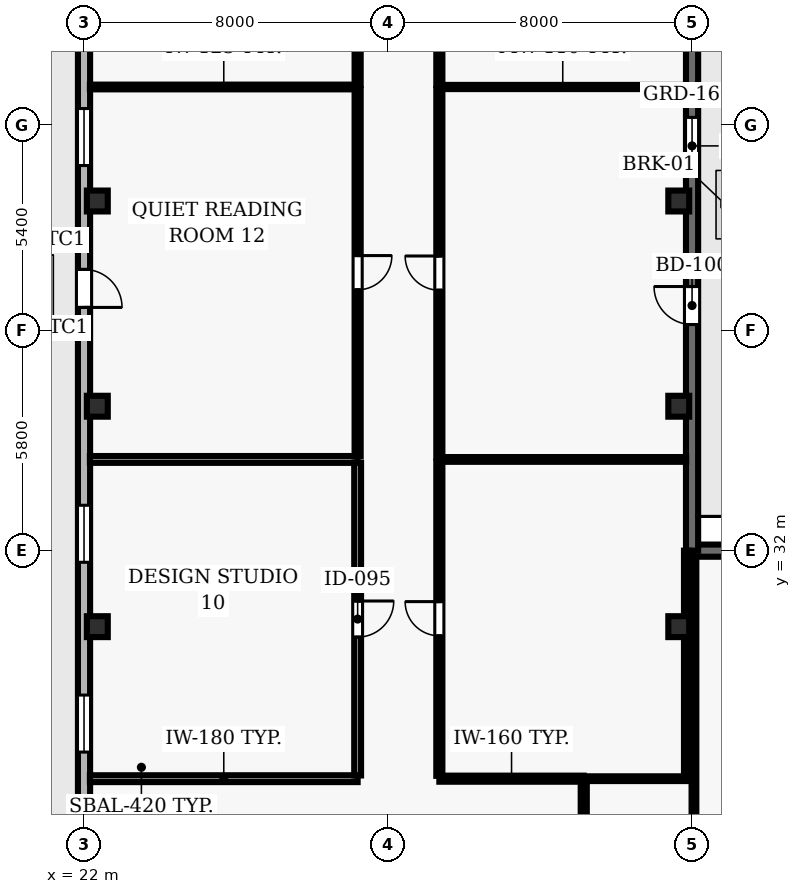
"""IFC4 building model, lengths in metres.
Left out: names, types, materials, properties, quantities, classifications, styles, units other than length and angle.
Written with IfcOpenShell. Run it as: python <this file> out.ifc"""

import sys

from ifc_helpers import new_model, si_unit, direction, frame, frame_2d, origin, origin_2d, place, context, subcontext, project, spatial, rectangle, hollow_rectangle, extrude, element, fill, save


model = new_model("IFC4")
c1 = context("Model", 3, precision=1e-05, world=origin(), true_north=direction((0.0, 1.0)))
c2 = subcontext(c1, "Body", "Model", "MODEL_VIEW")
j1 = project(units=[si_unit("LENGTHUNIT", "METRE"), si_unit("PLANEANGLEUNIT", "RADIAN")], contexts=[c1])
p1 = place(None, origin())
s1 = spatial("IfcSite", under=j1, at=p1, CompositionType="ELEMENT")
p2 = place(p1, origin())
s2 = spatial("IfcBuilding", under=s1, at=p2, CompositionType="ELEMENT")
p3 = place(p2, frame((0.0, 0.0, 26.0)))
s3 = spatial("IfcBuildingStorey", under=s2, at=p3, CompositionType="ELEMENT", Elevation=26.0)
for number, where, z_axis, x_axis in (
    (1, (22.35, 30.0, 0.0), (0.0, 0.0, 1.0), (1.0, 0.0, 0.0)),
    (2, (37.65, 30.0, 0.0), (0.0, 0.0, 1.0), (1.0, 0.0, 0.0)),
    (3, (22.35, 35.8, 0.0), (0.0, 0.0, 1.0), (1.0, 0.0, 0.0)),
    (4, (37.65, 35.8, 0.0), (0.0, 0.0, 1.0), (1.0, 0.0, 0.0)),
    (5, (22.35, 41.2, 0.0), (0.0, 0.0, 1.0), (1.0, 0.0, 0.0)),
    (6, (37.65, 41.2, 0.0), (0.0, 0.0, 1.0), (1.0, 0.0, 0.0)),
):
    element("IfcColumn", number, at=place(p3, frame(where, z_axis=z_axis, x_axis=x_axis)), inside=s3, PredefinedType="COLUMN", context=c2, shape_type="SweptSolid", body=[
        extrude(hollow_rectangle(XDim=0.55, YDim=0.55, WallThickness=0.025, at=origin_2d()), origin(), (0.0, 0.0, 1.0), 5.0),
    ])
p4 = place(p3, frame((52.8, 32.0, 0.0), z_axis=(0.0, 0.0, 1.0), x_axis=(-1.0, 0.0, 0.0)))
e7 = element("IfcWall", 7, at=p4, inside=s3, PredefinedType="SOLIDWALL", context=c2, shape_type="SweptSolid", body=[
    extrude(rectangle(XDim=14.8, YDim=0.32, at=frame_2d((7.4, 0.0))), origin(), (0.0, 0.0, 1.0), 4.79),
])
p5 = place(p4, frame((3.1, 0.0, 0.9)))
e8 = element("IfcOpeningElement", 8, at=p5, cuts=e7, PredefinedType="OPENING", context=c2, shape_type="SweptSolid", body=[
    extrude(rectangle(XDim=1.2, YDim=1.6, at=frame_2d((0.6, 0.8))), frame((0.0, 0.17, 0.0), z_axis=(0.0, -1.0, 0.0), x_axis=(1.0, 0.0, 0.0)), (0.0, 0.0, 1.0), 0.34),
])
p6 = place(p4, frame((10.5, 0.0, 0.9)))
e9 = element("IfcOpeningElement", 9, at=p6, cuts=e7, PredefinedType="OPENING", context=c2, shape_type="SweptSolid", body=[
    extrude(rectangle(XDim=1.2, YDim=1.6, at=frame_2d((0.6, 0.8))), frame((0.0, 0.17, 0.0), z_axis=(0.0, -1.0, 0.0), x_axis=(1.0, 0.0, 0.0)), (0.0, 0.0, 1.0), 0.34),
])
p7 = place(p3, frame((38.0, 32.0, 0.0), z_axis=(0.0, 0.0, 1.0), x_axis=(0.0, 1.0, 0.0)))
e10 = element("IfcWall", 10, at=p7, inside=s3, PredefinedType="SOLIDWALL", context=c2, shape_type="SweptSolid", body=[
    extrude(rectangle(XDim=19.5, YDim=0.32, at=frame_2d((9.75, 0.0))), origin(), (0.0, 0.0, 1.0), 4.79),
])
p8 = place(p7, frame((5.95, 0.0, 0.0)))
e11 = element("IfcOpeningElement", 11, at=p8, cuts=e10, PredefinedType="OPENING", context=c2, shape_type="SweptSolid", body=[
    extrude(rectangle(XDim=1.0, YDim=2.2, at=frame_2d((0.5, 1.1))), frame((0.0, 0.17, 0.0), z_axis=(0.0, -1.0, 0.0), x_axis=(1.0, 0.0, 0.0)), (0.0, 0.0, 1.0), 0.34),
])
p9 = place(p7, frame((9.9, 0.0, 0.9)))
e12 = element("IfcOpeningElement", 12, at=p9, cuts=e10, PredefinedType="OPENING", context=c2, shape_type="SweptSolid", body=[
    extrude(rectangle(XDim=1.5, YDim=1.6, at=frame_2d((0.75, 0.8))), frame((0.0, 0.17, 0.0), z_axis=(0.0, -1.0, 0.0), x_axis=(1.0, 0.0, 0.0)), (0.0, 0.0, 1.0), 0.34),
])
p10 = place(p7, frame((15.5, 0.0, 0.9)))
e13 = element("IfcOpeningElement", 13, at=p10, cuts=e10, PredefinedType="OPENING", context=c2, shape_type="SweptSolid", body=[
    extrude(rectangle(XDim=1.5, YDim=1.6, at=frame_2d((0.75, 0.8))), frame((0.0, 0.17, 0.0), z_axis=(0.0, -1.0, 0.0), x_axis=(1.0, 0.0, 0.0)), (0.0, 0.0, 1.0), 0.34),
])
p11 = place(p3, frame((22.0, 51.5, 0.0), z_axis=(0.0, 0.0, 1.0), x_axis=(0.0, -1.0, 0.0)))
e14 = element("IfcWall", 14, at=p11, inside=s3, PredefinedType="SOLIDWALL", context=c2, shape_type="SweptSolid", body=[
    extrude(rectangle(XDim=49.0, YDim=0.32, at=frame_2d((24.5, 0.0))), origin(), (0.0, 0.0, 1.0), 4.79),
])
p12 = place(p11, frame((12.1, 0.0, 0.0)))
e15 = element("IfcOpeningElement", 15, at=p12, cuts=e14, PredefinedType="OPENING", context=c2, shape_type="SweptSolid", body=[
    extrude(rectangle(XDim=1.0, YDim=2.2, at=frame_2d((0.5, 1.1))), frame((0.0, 0.17, 0.0), z_axis=(0.0, -1.0, 0.0), x_axis=(1.0, 0.0, 0.0)), (0.0, 0.0, 1.0), 0.34),
])
p13 = place(p11, frame((1.972, 0.0, 0.9)))
e16 = element("IfcOpeningElement", 16, at=p13, cuts=e14, PredefinedType="OPENING", context=c2, shape_type="SweptSolid", body=[
    extrude(rectangle(XDim=1.5, YDim=1.8, at=frame_2d((0.75, 0.9))), frame((0.0, 0.17, 0.0), z_axis=(0.0, -1.0, 0.0), x_axis=(1.0, 0.0, 0.0)), (0.0, 0.0, 1.0), 0.34),
])
p14 = place(p11, frame((7.867, 0.0, 0.9)))
e17 = element("IfcOpeningElement", 17, at=p14, cuts=e14, PredefinedType="OPENING", context=c2, shape_type="SweptSolid", body=[
    extrude(rectangle(XDim=1.5, YDim=1.8, at=frame_2d((0.75, 0.9))), frame((0.0, 0.17, 0.0), z_axis=(0.0, -1.0, 0.0), x_axis=(1.0, 0.0, 0.0)), (0.0, 0.0, 1.0), 0.34),
])
p15 = place(p11, frame((18.306, 0.0, 0.9)))
e18 = element("IfcOpeningElement", 18, at=p15, cuts=e14, PredefinedType="OPENING", context=c2, shape_type="SweptSolid", body=[
    extrude(rectangle(XDim=1.5, YDim=1.8, at=frame_2d((0.75, 0.9))), frame((0.0, 0.17, 0.0), z_axis=(0.0, -1.0, 0.0), x_axis=(1.0, 0.0, 0.0)), (0.0, 0.0, 1.0), 0.34),
])
p16 = place(p11, frame((23.3, 0.0, 0.9)))
e19 = element("IfcOpeningElement", 19, at=p16, cuts=e14, PredefinedType="OPENING", context=c2, shape_type="SweptSolid", body=[
    extrude(rectangle(XDim=1.5, YDim=1.8, at=frame_2d((0.75, 0.9))), frame((0.0, 0.17, 0.0), z_axis=(0.0, -1.0, 0.0), x_axis=(1.0, 0.0, 0.0)), (0.0, 0.0, 1.0), 0.34),
])
p17 = place(p11, frame((29.194, 0.0, 0.9)))
e20 = element("IfcOpeningElement", 20, at=p17, cuts=e14, PredefinedType="OPENING", context=c2, shape_type="SweptSolid", body=[
    extrude(rectangle(XDim=1.5, YDim=1.8, at=frame_2d((0.75, 0.9))), frame((0.0, 0.17, 0.0), z_axis=(0.0, -1.0, 0.0), x_axis=(1.0, 0.0, 0.0)), (0.0, 0.0, 1.0), 0.34),
])
p18 = place(p11, frame((34.189, 0.0, 0.9)))
e21 = element("IfcOpeningElement", 21, at=p18, cuts=e14, PredefinedType="OPENING", context=c2, shape_type="SweptSolid", body=[
    extrude(rectangle(XDim=1.5, YDim=1.8, at=frame_2d((0.75, 0.9))), frame((0.0, 0.17, 0.0), z_axis=(0.0, -1.0, 0.0), x_axis=(1.0, 0.0, 0.0)), (0.0, 0.0, 1.0), 0.34),
])
p19 = place(p11, frame((40.083, 0.0, 0.9)))
e22 = element("IfcOpeningElement", 22, at=p19, cuts=e14, PredefinedType="OPENING", context=c2, shape_type="SweptSolid", body=[
    extrude(rectangle(XDim=1.5, YDim=1.8, at=frame_2d((0.75, 0.9))), frame((0.0, 0.17, 0.0), z_axis=(0.0, -1.0, 0.0), x_axis=(1.0, 0.0, 0.0)), (0.0, 0.0, 1.0), 0.34),
])
for number, where, z_axis, x_axis in (
    (23, (29.2, 26.0, 0.0), (0.0, 0.0, 1.0), (-1.0, 0.0, 0.0)),
    (24, (29.2, 34.4, 0.0), (0.0, 0.0, 1.0), (-1.0, 0.0, 0.0)),
):
    element("IfcWall", number, at=place(p3, frame(where, z_axis=z_axis, x_axis=x_axis)), inside=s3, PredefinedType="PARTITIONING", context=c2, shape_type="SweptSolid", body=[
        extrude(rectangle(XDim=7.045, YDim=0.18, at=frame_2d((3.522, 0.0))), origin(), (0.0, 0.0, 1.0), 4.79),
    ])
p20 = place(p3, frame((29.2, 44.2, 0.0), z_axis=(0.0, 0.0, 1.0), x_axis=(-1.0, 0.0, 0.0)))
e25 = element("IfcWall", 25, at=p20, inside=s3, PredefinedType="PARTITIONING", context=c2, shape_type="SweptSolid", body=[
    extrude(rectangle(XDim=7.045, YDim=0.125, at=frame_2d((3.522, 0.0))), origin(), (0.0, 0.0, 1.0), 4.377),
])
p21 = place(p3, frame((35.15, 26.0, 0.0), z_axis=(0.0, 0.0, 1.0), x_axis=(-1.0, 0.0, 0.0)))
e26 = element("IfcWall", 26, at=p21, inside=s3, PredefinedType="PARTITIONING", context=c2, shape_type="SweptSolid", body=[
    extrude(rectangle(XDim=3.8, YDim=0.16, at=frame_2d((1.9, 0.0))), origin(), (0.0, 0.0, 1.0), 4.79),
])
p22 = place(p3, frame((35.15, 26.0, 0.0), z_axis=(0.0, 0.0, 1.0), x_axis=(1.0, 0.0, 0.0)))
e27 = element("IfcWall", 27, at=p22, inside=s3, PredefinedType="PARTITIONING", context=c2, shape_type="SweptSolid", body=[
    extrude(rectangle(XDim=2.7, YDim=0.125, at=frame_2d((1.35, 0.0))), origin(), (0.0, 0.0, 1.0), 4.79),
])
p23 = place(p3, frame((37.845, 34.4, 0.0), z_axis=(0.0, 0.0, 1.0), x_axis=(-1.0, 0.0, 0.0)))
e28 = element("IfcWall", 28, at=p23, inside=s3, PredefinedType="PARTITIONING", context=c2, shape_type="SweptSolid", body=[
    extrude(rectangle(XDim=6.495, YDim=0.125, at=frame_2d((3.248, 0.0))), origin(), (0.0, 0.0, 1.0), 4.79),
])
p24 = place(p3, frame((37.845, 44.2, 0.0), z_axis=(0.0, 0.0, 1.0), x_axis=(-1.0, 0.0, 0.0)))
e29 = element("IfcWall", 29, at=p24, inside=s3, PredefinedType="MOVABLE", context=c2, shape_type="SweptSolid", body=[
    extrude(rectangle(XDim=6.495, YDim=0.11, at=frame_2d((3.248, 0.0))), origin(), (0.0, 0.0, 1.0), 4.377),
])
p25 = place(p3, frame((29.2, 34.315, 0.0), z_axis=(0.0, 0.0, 1.0), x_axis=(0.0, -1.0, 0.0)))
e30 = element("IfcWall", 30, at=p25, inside=s3, PredefinedType="PARTITIONING", context=c2, shape_type="SweptSolid", body=[
    extrude(rectangle(XDim=8.23, YDim=0.18, at=frame_2d((4.115, 0.0))), origin(), (0.0, 0.0, 1.0), 4.79),
])
p26 = place(p25, frame((3.64, 0.0, 0.0)))
e31 = element("IfcOpeningElement", 31, at=p26, cuts=e30, PredefinedType="OPENING", context=c2, shape_type="SweptSolid", body=[
    extrude(rectangle(XDim=0.95, YDim=2.1, at=frame_2d((0.475, 1.05))), frame((0.0, 0.1, 0.0), z_axis=(0.0, -1.0, 0.0), x_axis=(1.0, 0.0, 0.0)), (0.0, 0.0, 1.0), 0.2),
])
p27 = place(p3, frame((29.2, 44.143, 0.0), z_axis=(0.0, 0.0, 1.0), x_axis=(0.0, -1.0, 0.0)))
e32 = element("IfcWall", 32, at=p27, inside=s3, PredefinedType="PARTITIONING", context=c2, shape_type="SweptSolid", body=[
    extrude(rectangle(XDim=9.658, YDim=0.16, at=frame_2d((4.829, 0.0))), origin(), (0.0, 0.0, 1.0), 4.79),
])
p28 = place(p27, frame((4.379, 0.0, 0.0)))
e33 = element("IfcOpeningElement", 33, at=p28, cuts=e32, PredefinedType="OPENING", context=c2, shape_type="SweptSolid", body=[
    extrude(rectangle(XDim=0.9, YDim=2.1, at=frame_2d((0.45, 1.05))), frame((0.0, 0.09, 0.0), z_axis=(0.0, -1.0, 0.0), x_axis=(1.0, 0.0, 0.0)), (0.0, 0.0, 1.0), 0.18),
])
p29 = place(p3, frame((29.2, 53.845, 0.0), z_axis=(0.0, 0.0, 1.0), x_axis=(0.0, -1.0, 0.0)))
e34 = element("IfcWall", 34, at=p29, inside=s3, PredefinedType="PARTITIONING", context=c2, shape_type="SweptSolid", body=[
    extrude(rectangle(XDim=9.587, YDim=0.16, at=frame_2d((4.793, 0.0))), origin(), (0.0, 0.0, 1.0), 4.79),
])
p30 = place(p29, frame((4.293, 0.0, 0.0)))
e35 = element("IfcOpeningElement", 35, at=p30, cuts=e34, PredefinedType="OPENING", context=c2, shape_type="SweptSolid", body=[
    extrude(rectangle(XDim=1.0, YDim=2.1, at=frame_2d((0.5, 1.05))), frame((0.0, 0.09, 0.0), z_axis=(0.0, -1.0, 0.0), x_axis=(1.0, 0.0, 0.0)), (0.0, 0.0, 1.0), 0.18),
])
p31 = place(p3, frame((31.35, 26.075, 0.0), z_axis=(0.0, 0.0, 1.0), x_axis=(0.0, 1.0, 0.0)))
e36 = element("IfcWall", 36, at=p31, inside=s3, PredefinedType="PARTITIONING", context=c2, shape_type="SweptSolid", body=[
    extrude(rectangle(XDim=8.268, YDim=0.16, at=frame_2d((4.134, 0.0))), origin(), (0.0, 0.0, 1.0), 4.79),
])
p32 = place(p31, frame((3.684, 0.0, 0.0)))
e37 = element("IfcOpeningElement", 37, at=p32, cuts=e36, PredefinedType="OPENING", context=c2, shape_type="SweptSolid", body=[
    extrude(rectangle(XDim=0.9, YDim=2.1, at=frame_2d((0.45, 1.05))), frame((0.0, 0.09, 0.0), z_axis=(0.0, -1.0, 0.0), x_axis=(1.0, 0.0, 0.0)), (0.0, 0.0, 1.0), 0.18),
])
p33 = place(p3, frame((31.35, 34.457, 0.0), z_axis=(0.0, 0.0, 1.0), x_axis=(0.0, 1.0, 0.0)))
e38 = element("IfcWall", 38, at=p33, inside=s3, PredefinedType="PARTITIONING", context=c2, shape_type="SweptSolid", body=[
    extrude(rectangle(XDim=9.693, YDim=0.16, at=frame_2d((4.846, 0.0))), origin(), (0.0, 0.0, 1.0), 4.79),
])
p34 = place(p33, frame((4.396, 0.0, 0.0)))
e39 = element("IfcOpeningElement", 39, at=p34, cuts=e38, PredefinedType="OPENING", context=c2, shape_type="SweptSolid", body=[
    extrude(rectangle(XDim=0.9, YDim=2.1, at=frame_2d((0.45, 1.05))), frame((0.0, 0.09, 0.0), z_axis=(0.0, -1.0, 0.0), x_axis=(1.0, 0.0, 0.0)), (0.0, 0.0, 1.0), 0.18),
])
p35 = place(p3, frame((31.35, 44.25, 0.0), z_axis=(0.0, 0.0, 1.0), x_axis=(0.0, 1.0, 0.0)))
e40 = element("IfcWall", 40, at=p35, inside=s3, PredefinedType="PARTITIONING", context=c2, shape_type="SweptSolid", body=[
    extrude(rectangle(XDim=9.595, YDim=0.16, at=frame_2d((4.797, 0.0))), origin(), (0.0, 0.0, 1.0), 4.79),
])
p36 = place(p35, frame((4.347, 0.0, 0.0)))
e41 = element("IfcOpeningElement", 41, at=p36, cuts=e40, PredefinedType="OPENING", context=c2, shape_type="SweptSolid", body=[
    extrude(rectangle(XDim=0.9, YDim=2.1, at=frame_2d((0.45, 1.05))), frame((0.0, 0.09, 0.0), z_axis=(0.0, -1.0, 0.0), x_axis=(1.0, 0.0, 0.0)), (0.0, 0.0, 1.0), 0.18),
])
p37 = place(p3, frame((35.15, 24.07, 0.0), z_axis=(0.0, 0.0, 1.0), x_axis=(0.0, 1.0, 0.0)))
e42 = element("IfcWall", 42, at=p37, inside=s3, PredefinedType="PARTITIONING", context=c2, shape_type="SweptSolid", body=[
    extrude(rectangle(XDim=1.855, YDim=0.16, at=frame_2d((0.927, 0.0))), origin(), (0.0, 0.0, 1.0), 4.79),
])
p38 = place(p3, frame((37.85, 26.058, 0.0), z_axis=(0.0, 0.0, 1.0), x_axis=(0.0, 1.0, 0.0)))
e43 = element("IfcWall", 43, at=p38, inside=s3, PredefinedType="PARTITIONING", context=c2, shape_type="SweptSolid", body=[
    extrude(rectangle(XDim=5.942, YDim=0.125, at=frame_2d((2.971, 0.0))), origin(), (0.0, 0.0, 1.0), 4.155),
])
p39 = place(p3, frame((38.05, 31.845, 0.0), z_axis=(0.0, 0.0, 1.0), x_axis=(0.0, -1.0, 0.0)))
e44 = element("IfcWall", 44, at=p39, inside=s3, PredefinedType="PARTITIONING", context=c2, shape_type="SweptSolid", body=[
    extrude(rectangle(XDim=7.795, YDim=0.125, at=frame_2d((3.897, 0.0))), origin(), (0.0, 0.0, 1.0), 4.155),
])
p40 = place(p8, origin())
e45 = element("IfcDoor", 45, at=p40, inside=s3, OperationType="SINGLE_SWING_RIGHT", PredefinedType="DOOR", context=c2, shape_type="SweptSolid", body=[
    extrude(rectangle(XDim=1.0, YDim=2.2, at=frame_2d((0.5, 1.1))), frame((0.0, 0.025, 0.0), z_axis=(0.0, -1.0, 0.0), x_axis=(1.0, 0.0, 0.0)), (0.0, 0.0, 1.0), 0.05),
])
fill(e11, e45)
p41 = place(p9, origin())
e46 = element("IfcWindow", 46, at=p41, inside=s3, PartitioningType="SINGLE_PANEL", PredefinedType="WINDOW", context=c2, shape_type="SweptSolid", body=[
    extrude(rectangle(XDim=1.5, YDim=1.6, at=frame_2d((0.75, 0.8))), frame((0.0, 0.03, 0.0), z_axis=(0.0, -1.0, 0.0), x_axis=(1.0, 0.0, 0.0)), (0.0, 0.0, 1.0), 0.06),
])
fill(e12, e46)
p42 = place(p12, origin())
e47 = element("IfcDoor", 47, at=p42, inside=s3, OperationType="SINGLE_SWING_RIGHT", PredefinedType="DOOR", context=c2, shape_type="SweptSolid", body=[
    extrude(rectangle(XDim=1.0, YDim=2.2, at=frame_2d((0.5, 1.1))), frame((0.0, 0.025, 0.0), z_axis=(0.0, -1.0, 0.0), x_axis=(1.0, 0.0, 0.0)), (0.0, 0.0, 1.0), 0.05),
])
fill(e15, e47)
p43 = place(p14, origin())
e48 = element("IfcWindow", 48, at=p43, inside=s3, PartitioningType="SINGLE_PANEL", PredefinedType="WINDOW", context=c2, shape_type="SweptSolid", body=[
    extrude(rectangle(XDim=1.5, YDim=1.8, at=frame_2d((0.75, 0.9))), frame((0.0, 0.03, 0.0), z_axis=(0.0, -1.0, 0.0), x_axis=(1.0, 0.0, 0.0)), (0.0, 0.0, 1.0), 0.06),
])
fill(e17, e48)
p44 = place(p15, origin())
e49 = element("IfcWindow", 49, at=p44, inside=s3, PartitioningType="SINGLE_PANEL", PredefinedType="WINDOW", context=c2, shape_type="SweptSolid", body=[
    extrude(rectangle(XDim=1.5, YDim=1.8, at=frame_2d((0.75, 0.9))), frame((0.0, 0.03, 0.0), z_axis=(0.0, -1.0, 0.0), x_axis=(1.0, 0.0, 0.0)), (0.0, 0.0, 1.0), 0.06),
])
fill(e18, e49)
p45 = place(p16, origin())
e50 = element("IfcWindow", 50, at=p45, inside=s3, PartitioningType="SINGLE_PANEL", PredefinedType="WINDOW", context=c2, shape_type="SweptSolid", body=[
    extrude(rectangle(XDim=1.5, YDim=1.8, at=frame_2d((0.75, 0.9))), frame((0.0, 0.03, 0.0), z_axis=(0.0, -1.0, 0.0), x_axis=(1.0, 0.0, 0.0)), (0.0, 0.0, 1.0), 0.06),
])
fill(e19, e50)
p46 = place(p26, origin())
e51 = element("IfcDoor", 51, at=p46, inside=s3, OperationType="SINGLE_SWING_LEFT", PredefinedType="DOOR", context=c2, shape_type="SweptSolid", body=[
    extrude(rectangle(XDim=0.95, YDim=2.1, at=frame_2d((0.475, 1.05))), frame((0.0, 0.025, 0.0), z_axis=(0.0, -1.0, 0.0), x_axis=(1.0, 0.0, 0.0)), (0.0, 0.0, 1.0), 0.05),
])
fill(e31, e51)
p47 = place(p32, origin())
e52 = element("IfcDoor", 52, at=p47, inside=s3, OperationType="SINGLE_SWING_RIGHT", PredefinedType="DOOR", context=c2, shape_type="SweptSolid", body=[
    extrude(rectangle(XDim=0.9, YDim=2.1, at=frame_2d((0.45, 1.05))), frame((0.0, 0.025, 0.0), z_axis=(0.0, -1.0, 0.0), x_axis=(1.0, 0.0, 0.0)), (0.0, 0.0, 1.0), 0.05),
])
fill(e37, e52)
p48 = place(p28, origin())
e53 = element("IfcDoor", 53, at=p48, inside=s3, OperationType="SINGLE_SWING_LEFT", PredefinedType="DOOR", context=c2, shape_type="SweptSolid", body=[
    extrude(rectangle(XDim=0.9, YDim=2.1, at=frame_2d((0.45, 1.05))), frame((0.0, 0.025, 0.0), z_axis=(0.0, -1.0, 0.0), x_axis=(1.0, 0.0, 0.0)), (0.0, 0.0, 1.0), 0.05),
])
fill(e33, e53)
p49 = place(p34, origin())
e54 = element("IfcDoor", 54, at=p49, inside=s3, OperationType="SINGLE_SWING_RIGHT", PredefinedType="DOOR", context=c2, shape_type="SweptSolid", body=[
    extrude(rectangle(XDim=0.9, YDim=2.1, at=frame_2d((0.45, 1.05))), frame((0.0, 0.025, 0.0), z_axis=(0.0, -1.0, 0.0), x_axis=(1.0, 0.0, 0.0)), (0.0, 0.0, 1.0), 0.05),
])
fill(e39, e54)
save(model, sys.argv[1])
